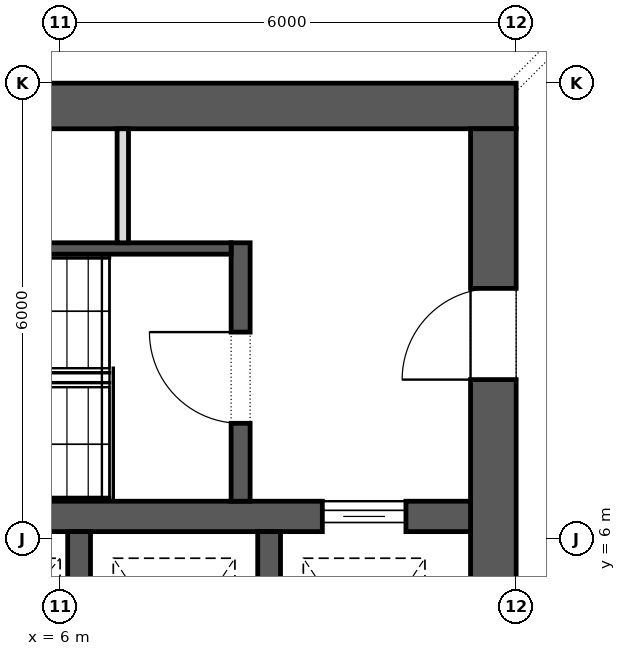
"""IFC4 building model, lengths in metres.
Left out: names, types, materials, properties, quantities, classifications, styles, units other than length and angle.
Written with IfcOpenShell. Run it as: python <this file> out.ifc"""

import sys

from ifc_helpers import new_model, si_unit, direction, frame, frame_2d, origin, place, context, subcontext, project, spatial, rectangle, extrude, element, fill, save


model = new_model("IFC4")
c1 = context("Model", 3, precision=1e-05, world=origin(), true_north=direction((0.0, 1.0)))
c2 = subcontext(c1, "Body", "Model", "MODEL_VIEW")
j1 = project(units=[si_unit("LENGTHUNIT", "METRE"), si_unit("PLANEANGLEUNIT", "RADIAN")], contexts=[c1])
p1 = place(None, origin())
s1 = spatial("IfcSite", under=j1, at=p1, CompositionType="ELEMENT")
p2 = place(p1, origin())
s2 = spatial("IfcBuilding", under=s1, at=p2, CompositionType="ELEMENT")
p3 = place(p2, frame((0.0, 0.0, 18.0)))
s3 = spatial("IfcBuildingStorey", under=s2, at=p3, CompositionType="ELEMENT", Elevation=18.0)
p4 = place(p3, frame((-12.0, 11.7, 0.0), z_axis=(0.0, 0.0, 1.0), x_axis=(1.0, 0.0, 0.0)))
e1 = element("IfcWall", 1, at=p4, inside=s3, PredefinedType="SHEAR", context=c2, shape_type="SweptSolid", body=[
    extrude(rectangle(XDim=24.0, YDim=0.6, at=frame_2d((12.0, 0.0))), origin(), (0.0, 0.0, 1.0), 5.5),
])
p5 = place(p4, frame((9.025, 0.0, 0.0)))
e2 = element("IfcOpeningElement", 2, at=p5, cuts=e1, PredefinedType="OPENING", context=c2, shape_type="SweptSolid", body=[
    extrude(rectangle(XDim=0.8, YDim=2.1, at=frame_2d((0.4, 1.05))), frame((0.0, 0.312, 0.0), z_axis=(0.0, -1.0, 0.0), x_axis=(1.0, 0.0, 0.0)), (0.0, 0.0, 1.0), 0.624),
])
p6 = place(p4, frame((10.625, 0.0, 0.0)))
e3 = element("IfcOpeningElement", 3, at=p6, cuts=e1, PredefinedType="OPENING", context=c2, shape_type="SweptSolid", body=[
    extrude(rectangle(XDim=0.9, YDim=2.1, at=frame_2d((0.45, 1.05))), frame((0.0, 0.312, 0.0), z_axis=(0.0, -1.0, 0.0), x_axis=(1.0, 0.0, 0.0)), (0.0, 0.0, 1.0), 0.624),
])
p7 = place(p4, frame((4.2, 0.0, 0.0)))
e4 = element("IfcOpeningElement", 4, at=p7, cuts=e1, PredefinedType="OPENING", context=c2, shape_type="SweptSolid", body=[
    extrude(rectangle(XDim=0.8, YDim=2.1, at=frame_2d((0.4, 1.05))), frame((0.0, 0.312, 0.0), z_axis=(0.0, -1.0, 0.0), x_axis=(1.0, 0.0, 0.0)), (0.0, 0.0, 1.0), 0.624),
])
p8 = place(p4, frame((6.2, 0.0, 0.0)))
e5 = element("IfcOpeningElement", 5, at=p8, cuts=e1, PredefinedType="OPENING", context=c2, shape_type="SweptSolid", body=[
    extrude(rectangle(XDim=0.8, YDim=2.1, at=frame_2d((0.4, 1.05))), frame((0.0, 0.312, 0.0), z_axis=(0.0, -1.0, 0.0), x_axis=(1.0, 0.0, 0.0)), (0.0, 0.0, 1.0), 0.624),
])
p9 = place(p4, frame((7.7, 0.0, 0.0)))
e6 = element("IfcOpeningElement", 6, at=p9, cuts=e1, PredefinedType="OPENING", context=c2, shape_type="SweptSolid", body=[
    extrude(rectangle(XDim=0.8, YDim=2.1, at=frame_2d((0.4, 1.05))), frame((0.0, 0.312, 0.0), z_axis=(0.0, -1.0, 0.0), x_axis=(1.0, 0.0, 0.0)), (0.0, 0.0, 1.0), 0.624),
])
p10 = place(p4, frame((15.85, 0.0, 0.0)))
e7 = element("IfcOpeningElement", 7, at=p10, cuts=e1, PredefinedType="OPENING", context=c2, shape_type="SweptSolid", body=[
    extrude(rectangle(XDim=0.8, YDim=2.1, at=frame_2d((0.4, 1.05))), frame((0.0, 0.312, 0.0), z_axis=(0.0, -1.0, 0.0), x_axis=(1.0, 0.0, 0.0)), (0.0, 0.0, 1.0), 0.624),
])
p11 = place(p3, frame((11.7, -11.4, 0.0), z_axis=(0.0, 0.0, 1.0), x_axis=(0.0, 1.0, 0.0)))
e8 = element("IfcWall", 8, at=p11, inside=s3, PredefinedType="SHEAR", context=c2, shape_type="SweptSolid", body=[
    extrude(rectangle(XDim=22.8, YDim=0.6, at=frame_2d((11.4, 0.0))), origin(), (0.0, 0.0, 1.0), 5.5),
])
p12 = place(p11, frame((10.2, 0.0, 0.0)))
e9 = element("IfcOpeningElement", 9, at=p12, cuts=e8, PredefinedType="OPENING", context=c2, shape_type="SweptSolid", body=[
    extrude(rectangle(XDim=2.4, YDim=2.1, at=frame_2d((1.2, 1.05))), frame((0.0, 0.312, 0.0), z_axis=(0.0, -1.0, 0.0), x_axis=(1.0, 0.0, 0.0)), (0.0, 0.0, 1.0), 0.624),
])
p13 = place(p11, frame((19.5, 0.0, 0.0)))
e10 = element("IfcOpeningElement", 10, at=p13, cuts=e8, PredefinedType="OPENING", context=c2, shape_type="SweptSolid", body=[
    extrude(rectangle(XDim=1.2, YDim=2.1, at=frame_2d((0.6, 1.05))), frame((0.0, 0.312, 0.0), z_axis=(0.0, -1.0, 0.0), x_axis=(1.0, 0.0, 0.0)), (0.0, 0.0, 1.0), 0.624),
])
p14 = place(p11, frame((2.1, 0.0, 0.0)))
e11 = element("IfcOpeningElement", 11, at=p14, cuts=e8, PredefinedType="OPENING", context=c2, shape_type="SweptSolid", body=[
    extrude(rectangle(XDim=1.2, YDim=2.1, at=frame_2d((0.6, 1.05))), frame((0.0, 0.312, 0.0), z_axis=(0.0, -1.0, 0.0), x_axis=(1.0, 0.0, 0.0)), (0.0, 0.0, 1.0), 0.624),
])
p15 = place(p3, frame((-11.4, 6.3, 0.0), z_axis=(0.0, 0.0, 1.0), x_axis=(1.0, 0.0, 0.0)))
e12 = element("IfcWall", 12, at=p15, inside=s3, PredefinedType="SHEAR", context=c2, shape_type="SweptSolid", body=[
    extrude(rectangle(XDim=22.8, YDim=0.4, at=frame_2d((11.4, 0.0))), origin(), (0.0, 0.0, 1.0), 5.5),
])
p16 = place(p15, frame((20.85, 0.0, 0.0)))
e13 = element("IfcOpeningElement", 13, at=p16, cuts=e12, PredefinedType="OPENING", context=c2, shape_type="SweptSolid", body=[
    extrude(rectangle(XDim=1.1, YDim=2.1, at=frame_2d((0.55, 1.05))), frame((0.0, 0.212, 0.0), z_axis=(0.0, -1.0, 0.0), x_axis=(1.0, 0.0, 0.0)), (0.0, 0.0, 1.0), 0.424),
])
for number, where, z_axis, x_axis in (
    (14, (6.25, 3.2, 0.0), (0.0, 0.0, 1.0), (0.0, 1.0, 0.0)),
    (15, (8.75, 3.2, 0.0), (0.0, 0.0, 1.0), (0.0, 1.0, 0.0)),
):
    element("IfcWall", number, at=place(p3, frame(where, z_axis=z_axis, x_axis=x_axis)), inside=s3, PredefinedType="SHEAR", context=c2, shape_type="SweptSolid", body=[
        extrude(rectangle(XDim=2.9, YDim=0.3, at=frame_2d((1.45, 0.0))), origin(), (0.0, 0.0, 1.0), 5.5),
    ])
p17 = place(p3, frame((8.375, 6.5, 0.0), z_axis=(0.0, 0.0, 1.0), x_axis=(0.0, 1.0, 0.0)))
e16 = element("IfcWall", 16, at=p17, inside=s3, PredefinedType="SHEAR", context=c2, shape_type="SweptSolid", body=[
    extrude(rectangle(XDim=3.4, YDim=0.25, at=frame_2d((1.7, 0.0))), origin(), (0.0, 0.0, 1.0), 5.2),
])
p18 = place(p17, frame((1.025, 0.0, 0.0)))
e17 = element("IfcOpeningElement", 17, at=p18, cuts=e16, PredefinedType="OPENING", context=c2, shape_type="SweptSolid", body=[
    extrude(rectangle(XDim=1.2, YDim=2.1, at=frame_2d((0.6, 1.05))), frame((0.0, 0.137, 0.0), z_axis=(0.0, -1.0, 0.0), x_axis=(1.0, 0.0, 0.0)), (0.0, 0.0, 1.0), 0.274),
])
p19 = place(p3, frame((0.25, 9.825, 0.0), z_axis=(0.0, 0.0, 1.0), x_axis=(1.0, 0.0, 0.0)))
e18 = element("IfcWall", 18, at=p19, inside=s3, PredefinedType="SHEAR", context=c2, shape_type="SweptSolid", body=[
    extrude(rectangle(XDim=8.0, YDim=0.15, at=frame_2d((4.0, 0.0))), origin(), (0.0, 0.0, 1.0), 5.2),
])
p20 = place(p3, frame((6.825, 9.9, 0.0), z_axis=(0.0, 0.0, 1.0), x_axis=(0.0, 1.0, 0.0)))
e19 = element("IfcWall", 19, at=p20, inside=s3, PredefinedType="PARTITIONING", context=c2, shape_type="SweptSolid", body=[
    extrude(rectangle(XDim=1.5, YDim=0.15, at=frame_2d((0.75, 0.0))), origin(), (0.0, 0.0, 1.0), 5.2),
])
p21 = place(p16, origin())
e20 = element("IfcDoor", 20, at=p21, inside=s3, OperationType="SLIDING_TO_LEFT", PredefinedType="DOOR", context=c2, shape_type="SweptSolid", body=[
    extrude(rectangle(XDim=1.1, YDim=2.1, at=frame_2d((0.55, 1.05))), frame((0.0, 0.025, 0.0), z_axis=(0.0, -1.0, 0.0), x_axis=(1.0, 0.0, 0.0)), (0.0, 0.0, 1.0), 0.05),
])
fill(e13, e20)
p22 = place(p18, origin())
e21 = element("IfcDoor", 21, at=p22, inside=s3, OperationType="SINGLE_SWING_LEFT", PredefinedType="DOOR", context=c2, shape_type="SweptSolid", body=[
    extrude(rectangle(XDim=1.2, YDim=2.1, at=frame_2d((0.6, 1.05))), frame((0.0, 0.025, 0.0), z_axis=(0.0, -1.0, 0.0), x_axis=(1.0, 0.0, 0.0)), (0.0, 0.0, 1.0), 0.05),
])
fill(e17, e21)
p23 = place(p13, origin())
e22 = element("IfcDoor", 22, at=p23, inside=s3, OperationType="SINGLE_SWING_RIGHT", PredefinedType="DOOR", context=c2, shape_type="SweptSolid", body=[
    extrude(rectangle(XDim=1.2, YDim=2.1, at=frame_2d((0.6, 1.05))), frame((0.0, 0.025, 0.0), z_axis=(0.0, -1.0, 0.0), x_axis=(1.0, 0.0, 0.0)), (0.0, 0.0, 1.0), 0.05),
])
fill(e10, e22)
save(model, sys.argv[1])
